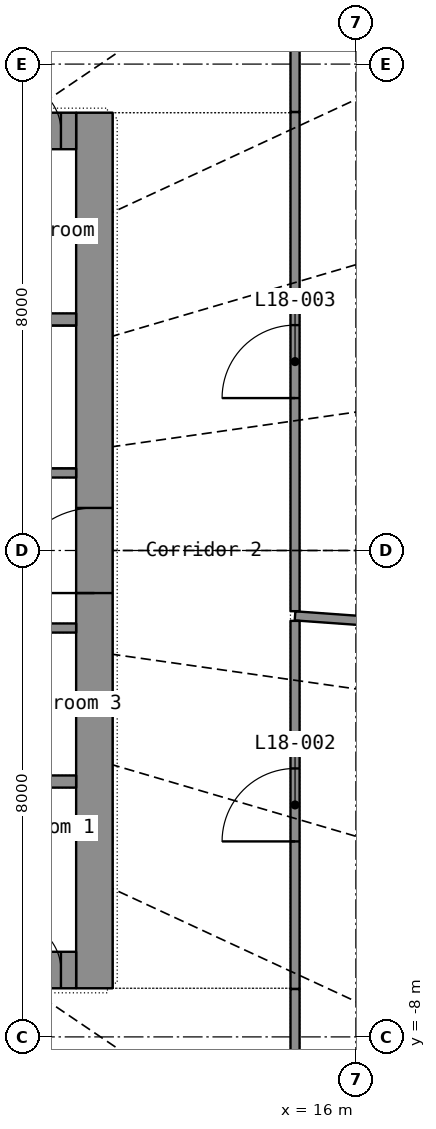
"""IFC4 building model, lengths in metres.
Left out: names, types, materials, properties, quantities, classifications, styles, units other than length and angle.
Written with IfcOpenShell. Run it as: python <this file> out.ifc"""

import sys

from ifc_helpers import new_model, si_unit, direction, frame, frame_2d, origin, place, context, subcontext, project, spatial, rectangle, extrude, element, fill, save


model = new_model("IFC4")
c1 = context("Model", 3, precision=1e-05, world=origin(), true_north=direction((0.0, 1.0)))
c2 = subcontext(c1, "Body", "Model", "MODEL_VIEW")
j1 = project(units=[si_unit("LENGTHUNIT", "METRE"), si_unit("PLANEANGLEUNIT", "RADIAN")], contexts=[c1])
p1 = place(None, origin())
s1 = spatial("IfcSite", under=j1, at=p1, CompositionType="ELEMENT")
p2 = place(p1, origin())
s2 = spatial("IfcBuilding", under=s1, at=p2, CompositionType="ELEMENT")
p3 = place(p2, frame((0.0, 0.0, 77.8)))
s3 = spatial("IfcBuildingStorey", under=s2, at=p3, CompositionType="ELEMENT", Elevation=77.8)
p4 = place(p3, frame((11.7, -7.2, 0.0), z_axis=(0.0, 0.0, 1.0), x_axis=(0.0, 1.0, 0.0)))
e1 = element("IfcWall", 1, at=p4, inside=s3, PredefinedType="SHEAR", context=c2, shape_type="SweptSolid", body=[
    extrude(rectangle(XDim=14.4, YDim=0.6, at=frame_2d((7.2, 0.0))), origin(), (0.0, 0.0, 1.0), 3.3),
])
p5 = place(p4, frame((6.5, 0.0, 0.0)))
e2 = element("IfcOpeningElement", 2, at=p5, cuts=e1, PredefinedType="OPENING", context=c2, shape_type="SweptSolid", body=[
    extrude(rectangle(XDim=1.4, YDim=2.2, at=frame_2d((0.7, 1.1))), frame((0.0, 0.31, 0.0), z_axis=(0.0, -1.0, 0.0), x_axis=(1.0, 0.0, 0.0)), (0.0, 0.0, 1.0), 0.62),
])
p6 = place(p3, frame((-11.4, -6.9, 0.0), z_axis=(0.0, 0.0, 1.0), x_axis=(1.0, 0.0, 0.0)))
e3 = element("IfcWall", 3, at=p6, inside=s3, PredefinedType="SHEAR", context=c2, shape_type="SweptSolid", body=[
    extrude(rectangle(XDim=22.8, YDim=0.6, at=frame_2d((11.4, 0.0))), origin(), (0.0, 0.0, 1.0), 3.3),
])
p7 = place(p6, frame((1.85, 0.0, 0.0)))
e4 = element("IfcOpeningElement", 4, at=p7, cuts=e3, PredefinedType="OPENING", context=c2, shape_type="SweptSolid", body=[
    extrude(rectangle(XDim=1.1, YDim=2.2, at=frame_2d((0.55, 1.1))), frame((0.0, 0.31, 0.0), z_axis=(0.0, -1.0, 0.0), x_axis=(1.0, 0.0, 0.0)), (0.0, 0.0, 1.0), 0.62),
])
p8 = place(p6, frame((3.85, 0.0, 0.0)))
e5 = element("IfcOpeningElement", 5, at=p8, cuts=e3, PredefinedType="OPENING", context=c2, shape_type="SweptSolid", body=[
    extrude(rectangle(XDim=1.1, YDim=2.2, at=frame_2d((0.55, 1.1))), frame((0.0, 0.31, 0.0), z_axis=(0.0, -1.0, 0.0), x_axis=(1.0, 0.0, 0.0)), (0.0, 0.0, 1.0), 0.62),
])
p9 = place(p6, frame((5.85, 0.0, 0.0)))
e6 = element("IfcOpeningElement", 6, at=p9, cuts=e3, PredefinedType="OPENING", context=c2, shape_type="SweptSolid", body=[
    extrude(rectangle(XDim=1.1, YDim=2.2, at=frame_2d((0.55, 1.1))), frame((0.0, 0.31, 0.0), z_axis=(0.0, -1.0, 0.0), x_axis=(1.0, 0.0, 0.0)), (0.0, 0.0, 1.0), 0.62),
])
p10 = place(p6, frame((7.85, 0.0, 0.0)))
e7 = element("IfcOpeningElement", 7, at=p10, cuts=e3, PredefinedType="OPENING", context=c2, shape_type="SweptSolid", body=[
    extrude(rectangle(XDim=1.1, YDim=2.2, at=frame_2d((0.55, 1.1))), frame((0.0, 0.31, 0.0), z_axis=(0.0, -1.0, 0.0), x_axis=(1.0, 0.0, 0.0)), (0.0, 0.0, 1.0), 0.62),
])
p11 = place(p6, frame((9.85, 0.0, 0.0)))
e8 = element("IfcOpeningElement", 8, at=p11, cuts=e3, PredefinedType="OPENING", context=c2, shape_type="SweptSolid", body=[
    extrude(rectangle(XDim=1.1, YDim=2.2, at=frame_2d((0.55, 1.1))), frame((0.0, 0.31, 0.0), z_axis=(0.0, -1.0, 0.0), x_axis=(1.0, 0.0, 0.0)), (0.0, 0.0, 1.0), 0.62),
])
p12 = place(p6, frame((11.85, 0.0, 0.0)))
e9 = element("IfcOpeningElement", 9, at=p12, cuts=e3, PredefinedType="OPENING", context=c2, shape_type="SweptSolid", body=[
    extrude(rectangle(XDim=1.1, YDim=2.2, at=frame_2d((0.55, 1.1))), frame((0.0, 0.31, 0.0), z_axis=(0.0, -1.0, 0.0), x_axis=(1.0, 0.0, 0.0)), (0.0, 0.0, 1.0), 0.62),
])
p13 = place(p6, frame((13.85, 0.0, 0.0)))
e10 = element("IfcOpeningElement", 10, at=p13, cuts=e3, PredefinedType="OPENING", context=c2, shape_type="SweptSolid", body=[
    extrude(rectangle(XDim=1.1, YDim=2.2, at=frame_2d((0.55, 1.1))), frame((0.0, 0.31, 0.0), z_axis=(0.0, -1.0, 0.0), x_axis=(1.0, 0.0, 0.0)), (0.0, 0.0, 1.0), 0.62),
])
p14 = place(p6, frame((15.85, 0.0, 0.0)))
e11 = element("IfcOpeningElement", 11, at=p14, cuts=e3, PredefinedType="OPENING", context=c2, shape_type="SweptSolid", body=[
    extrude(rectangle(XDim=1.1, YDim=2.2, at=frame_2d((0.55, 1.1))), frame((0.0, 0.31, 0.0), z_axis=(0.0, -1.0, 0.0), x_axis=(1.0, 0.0, 0.0)), (0.0, 0.0, 1.0), 0.62),
])
p15 = place(p6, frame((19.85, 0.0, 0.0)))
e12 = element("IfcOpeningElement", 12, at=p15, cuts=e3, PredefinedType="OPENING", context=c2, shape_type="SweptSolid", body=[
    extrude(rectangle(XDim=1.1, YDim=2.2, at=frame_2d((0.55, 1.1))), frame((0.0, 0.31, 0.0), z_axis=(0.0, -1.0, 0.0), x_axis=(1.0, 0.0, 0.0)), (0.0, 0.0, 1.0), 0.62),
])
p16 = place(p6, frame((0.25, 0.0, 0.0)))
e13 = element("IfcOpeningElement", 13, at=p16, cuts=e3, PredefinedType="OPENING", context=c2, shape_type="SweptSolid", body=[
    extrude(rectangle(XDim=0.8, YDim=2.05, at=frame_2d((0.4, 1.025))), frame((0.0, 0.31, 0.0), z_axis=(0.0, -1.0, 0.0), x_axis=(1.0, 0.0, 0.0)), (0.0, 0.0, 1.0), 0.62),
])
p17 = place(p6, frame((21.75, 0.0, 0.0)))
e14 = element("IfcOpeningElement", 14, at=p17, cuts=e3, PredefinedType="OPENING", context=c2, shape_type="SweptSolid", body=[
    extrude(rectangle(XDim=0.8, YDim=2.05, at=frame_2d((0.4, 1.025))), frame((0.0, 0.31, 0.0), z_axis=(0.0, -1.0, 0.0), x_axis=(1.0, 0.0, 0.0)), (0.0, 0.0, 1.0), 0.62),
])
p18 = place(p3, frame((-11.4, 6.9, 0.0), z_axis=(0.0, 0.0, 1.0), x_axis=(1.0, 0.0, 0.0)))
e15 = element("IfcWall", 15, at=p18, inside=s3, PredefinedType="SHEAR", context=c2, shape_type="SweptSolid", body=[
    extrude(rectangle(XDim=22.8, YDim=0.6, at=frame_2d((11.4, 0.0))), origin(), (0.0, 0.0, 1.0), 3.3),
])
p19 = place(p18, frame((1.85, 0.0, 0.0)))
e16 = element("IfcOpeningElement", 16, at=p19, cuts=e15, PredefinedType="OPENING", context=c2, shape_type="SweptSolid", body=[
    extrude(rectangle(XDim=1.1, YDim=2.2, at=frame_2d((0.55, 1.1))), frame((0.0, 0.31, 0.0), z_axis=(0.0, -1.0, 0.0), x_axis=(1.0, 0.0, 0.0)), (0.0, 0.0, 1.0), 0.62),
])
p20 = place(p18, frame((7.95, 0.0, 0.0)))
e17 = element("IfcOpeningElement", 17, at=p20, cuts=e15, PredefinedType="OPENING", context=c2, shape_type="SweptSolid", body=[
    extrude(rectangle(XDim=0.9, YDim=2.1, at=frame_2d((0.45, 1.05))), frame((0.0, 0.31, 0.0), z_axis=(0.0, -1.0, 0.0), x_axis=(1.0, 0.0, 0.0)), (0.0, 0.0, 1.0), 0.62),
])
p21 = place(p18, frame((13.95, 0.0, 0.0)))
e18 = element("IfcOpeningElement", 18, at=p21, cuts=e15, PredefinedType="OPENING", context=c2, shape_type="SweptSolid", body=[
    extrude(rectangle(XDim=0.9, YDim=2.1, at=frame_2d((0.45, 1.05))), frame((0.0, 0.31, 0.0), z_axis=(0.0, -1.0, 0.0), x_axis=(1.0, 0.0, 0.0)), (0.0, 0.0, 1.0), 0.62),
])
p22 = place(p18, frame((18.95, 0.0, 0.0)))
e19 = element("IfcOpeningElement", 19, at=p22, cuts=e15, PredefinedType="OPENING", context=c2, shape_type="SweptSolid", body=[
    extrude(rectangle(XDim=0.9, YDim=2.1, at=frame_2d((0.45, 1.05))), frame((0.0, 0.31, 0.0), z_axis=(0.0, -1.0, 0.0), x_axis=(1.0, 0.0, 0.0)), (0.0, 0.0, 1.0), 0.62),
])
p23 = place(p18, frame((0.25, 0.0, 0.0)))
e20 = element("IfcOpeningElement", 20, at=p23, cuts=e15, PredefinedType="OPENING", context=c2, shape_type="SweptSolid", body=[
    extrude(rectangle(XDim=0.8, YDim=2.05, at=frame_2d((0.4, 1.025))), frame((0.0, 0.31, 0.0), z_axis=(0.0, -1.0, 0.0), x_axis=(1.0, 0.0, 0.0)), (0.0, 0.0, 1.0), 0.62),
])
p24 = place(p18, frame((21.75, 0.0, 0.0)))
e21 = element("IfcOpeningElement", 21, at=p24, cuts=e15, PredefinedType="OPENING", context=c2, shape_type="SweptSolid", body=[
    extrude(rectangle(XDim=0.8, YDim=2.05, at=frame_2d((0.4, 1.025))), frame((0.0, 0.31, 0.0), z_axis=(0.0, -1.0, 0.0), x_axis=(1.0, 0.0, 0.0)), (0.0, 0.0, 1.0), 0.62),
])
for number, where, z_axis, x_axis in (
    (22, (-11.4, -3.8, 0.0), (0.0, 0.0, 1.0), (1.0, 0.0, 0.0)),
    (23, (-11.4, 3.8, 0.0), (0.0, 0.0, 1.0), (1.0, 0.0, 0.0)),
):
    element("IfcWall", number, at=place(p3, frame(where, z_axis=z_axis, x_axis=x_axis)), inside=s3, PredefinedType="SHEAR", context=c2, shape_type="SweptSolid", body=[
        extrude(rectangle(XDim=22.8, YDim=0.2, at=frame_2d((11.4, 0.0))), origin(), (0.0, 0.0, 1.0), 3.3),
    ])
p25 = place(p3, frame((3.0, -1.275, 0.0), z_axis=(0.0, 0.0, 1.0), x_axis=(1.0, 0.0, 0.0)))
e24 = element("IfcWall", 24, at=p25, inside=s3, PredefinedType="PARTITIONING", context=c2, shape_type="SweptSolid", body=[
    extrude(rectangle(XDim=8.4, YDim=0.15, at=frame_2d((4.2, 0.0))), origin(), (0.0, 0.0, 1.0), 3.3),
])
p26 = place(p25, frame((0.688, 0.0, 0.0)))
e25 = element("IfcOpeningElement", 25, at=p26, cuts=e24, PredefinedType="OPENING", context=c2, shape_type="SweptSolid", body=[
    extrude(rectangle(XDim=0.85, YDim=2.1, at=frame_2d((0.425, 1.05))), frame((0.0, 0.085, 0.0), z_axis=(0.0, -1.0, 0.0), x_axis=(1.0, 0.0, 0.0)), (0.0, 0.0, 1.0), 0.17),
])
p27 = place(p25, frame((3.144, 0.0, 0.0)))
e26 = element("IfcOpeningElement", 26, at=p27, cuts=e24, PredefinedType="OPENING", context=c2, shape_type="SweptSolid", body=[
    extrude(rectangle(XDim=0.85, YDim=2.1, at=frame_2d((0.425, 1.05))), frame((0.0, 0.085, 0.0), z_axis=(0.0, -1.0, 0.0), x_axis=(1.0, 0.0, 0.0)), (0.0, 0.0, 1.0), 0.17),
])
p28 = place(p25, frame((5.256, 0.0, 0.0)))
e27 = element("IfcOpeningElement", 27, at=p28, cuts=e24, PredefinedType="OPENING", context=c2, shape_type="SweptSolid", body=[
    extrude(rectangle(XDim=0.9, YDim=2.1, at=frame_2d((0.45, 1.05))), frame((0.0, 0.085, 0.0), z_axis=(0.0, -1.0, 0.0), x_axis=(1.0, 0.0, 0.0)), (0.0, 0.0, 1.0), 0.17),
])
p29 = place(p25, frame((7.075, 0.0, 0.0)))
e28 = element("IfcOpeningElement", 28, at=p29, cuts=e24, PredefinedType="OPENING", context=c2, shape_type="SweptSolid", body=[
    extrude(rectangle(XDim=0.9, YDim=2.1, at=frame_2d((0.45, 1.05))), frame((0.0, 0.085, 0.0), z_axis=(0.0, -1.0, 0.0), x_axis=(1.0, 0.0, 0.0)), (0.0, 0.0, 1.0), 0.17),
])
p30 = place(p3, frame((3.0, 1.275, 0.0), z_axis=(0.0, 0.0, 1.0), x_axis=(1.0, 0.0, 0.0)))
e29 = element("IfcWall", 29, at=p30, inside=s3, PredefinedType="SHEAR", context=c2, shape_type="SweptSolid", body=[
    extrude(rectangle(XDim=8.4, YDim=0.15, at=frame_2d((4.2, 0.0))), origin(), (0.0, 0.0, 1.0), 3.3),
])
p31 = place(p30, frame((2.05, 0.0, 0.0)))
e30 = element("IfcOpeningElement", 30, at=p31, cuts=e29, PredefinedType="OPENING", context=c2, shape_type="SweptSolid", body=[
    extrude(rectangle(XDim=1.1, YDim=2.15, at=frame_2d((0.55, 1.075))), frame((0.0, 0.085, 0.0), z_axis=(0.0, -1.0, 0.0), x_axis=(1.0, 0.0, 0.0)), (0.0, 0.0, 1.0), 0.17),
])
p32 = place(p30, frame((0.45, 0.0, 0.0)))
e31 = element("IfcOpeningElement", 31, at=p32, cuts=e29, PredefinedType="OPENING", context=c2, shape_type="SweptSolid", body=[
    extrude(rectangle(XDim=0.9, YDim=2.1, at=frame_2d((0.45, 1.05))), frame((0.0, 0.085, 0.0), z_axis=(0.0, -1.0, 0.0), x_axis=(1.0, 0.0, 0.0)), (0.0, 0.0, 1.0), 0.17),
])
p33 = place(p3, frame((26.692, -1.913, 0.0), z_axis=(0.0, 0.0, 1.0), x_axis=(-0.997441861, 0.071482396, 0.0)))
e32 = element("IfcWall", 32, at=p33, inside=s3, PredefinedType="PARTITIONING", context=c2, shape_type="SweptSolid", body=[
    extrude(rectangle(XDim=11.722, YDim=0.15, at=frame_2d((5.861, 0.0))), origin(), (0.0, 0.0, 1.0), 2.4),
])
p34 = place(p3, frame((15.0, -0.998, 0.0), z_axis=(0.0, 0.0, 1.0), x_axis=(0.0, 1.0, 0.0)))
e33 = element("IfcWall", 33, at=p34, inside=s3, PredefinedType="PARTITIONING", context=c2, shape_type="SweptSolid", body=[
    extrude(rectangle(XDim=8.21, YDim=0.15, at=frame_2d((4.105, 0.0))), origin(), (0.0, 0.0, 1.0), 2.4),
])
p35 = place(p34, frame((3.505, 0.0, 0.0)))
e34 = element("IfcOpeningElement", 34, at=p35, cuts=e33, PredefinedType="OPENING", context=c2, shape_type="SweptSolid", body=[
    extrude(rectangle(XDim=1.2, YDim=2.2, at=frame_2d((0.6, 1.1))), frame((0.0, 0.085, 0.0), z_axis=(0.0, -1.0, 0.0), x_axis=(1.0, 0.0, 0.0)), (0.0, 0.0, 1.0), 0.17),
])
p36 = place(p3, frame((15.0, -7.212, 0.0), z_axis=(0.0, 0.0, 1.0), x_axis=(0.0, 1.0, 0.0)))
e35 = element("IfcWall", 35, at=p36, inside=s3, PredefinedType="PARTITIONING", context=c2, shape_type="SweptSolid", body=[
    extrude(rectangle(XDim=6.054, YDim=0.15, at=frame_2d((3.027, 0.0))), origin(), (0.0, 0.0, 1.0), 2.4),
])
p37 = place(p36, frame((2.427, 0.0, 0.0)))
e36 = element("IfcOpeningElement", 36, at=p37, cuts=e35, PredefinedType="OPENING", context=c2, shape_type="SweptSolid", body=[
    extrude(rectangle(XDim=1.2, YDim=2.2, at=frame_2d((0.6, 1.1))), frame((0.0, 0.085, 0.0), z_axis=(0.0, -1.0, 0.0), x_axis=(1.0, 0.0, 0.0)), (0.0, 0.0, 1.0), 0.17),
])
p38 = place(p3, frame((15.0, -10.723, 0.0), z_axis=(0.0, 0.0, 1.0), x_axis=(0.0, 1.0, 0.0)))
e37 = element("IfcWall", 37, at=p38, inside=s3, PredefinedType="PARTITIONING", context=c2, shape_type="SweptSolid", body=[
    extrude(rectangle(XDim=3.51, YDim=0.15, at=frame_2d((1.755, 0.0))), origin(), (0.0, 0.0, 1.0), 2.4),
])
p39 = place(p3, frame((15.0, 7.213, 0.0), z_axis=(0.0, 0.0, 1.0), x_axis=(0.0, 1.0, 0.0)))
e38 = element("IfcWall", 38, at=p39, inside=s3, PredefinedType="PARTITIONING", context=c2, shape_type="SweptSolid", body=[
    extrude(rectangle(XDim=2.31, YDim=0.15, at=frame_2d((1.155, 0.0))), origin(), (0.0, 0.0, 1.0), 2.4),
])
p40 = place(p17, origin())
e39 = element("IfcDoor", 39, at=p40, inside=s3, OperationType="SINGLE_SWING_LEFT", PredefinedType="DOOR", context=c2, shape_type="SweptSolid", body=[
    extrude(rectangle(XDim=0.8, YDim=2.05, at=frame_2d((0.4, 1.025))), frame((0.0, 0.025, 0.0), z_axis=(0.0, -1.0, 0.0), x_axis=(1.0, 0.0, 0.0)), (0.0, 0.0, 1.0), 0.05),
])
fill(e14, e39)
p41 = place(p24, origin())
e40 = element("IfcDoor", 40, at=p41, inside=s3, OperationType="SINGLE_SWING_LEFT", PredefinedType="DOOR", context=c2, shape_type="SweptSolid", body=[
    extrude(rectangle(XDim=0.8, YDim=2.05, at=frame_2d((0.4, 1.025))), frame((0.0, 0.025, 0.0), z_axis=(0.0, -1.0, 0.0), x_axis=(1.0, 0.0, 0.0)), (0.0, 0.0, 1.0), 0.05),
])
fill(e21, e40)
p42 = place(p5, origin())
e41 = element("IfcDoor", 41, at=p42, inside=s3, OperationType="DOUBLE_DOOR_SINGLE_SWING", PredefinedType="DOOR", context=c2, shape_type="SweptSolid", body=[
    extrude(rectangle(XDim=1.4, YDim=2.2, at=frame_2d((0.7, 1.1))), frame((0.0, 0.025, 0.0), z_axis=(0.0, -1.0, 0.0), x_axis=(1.0, 0.0, 0.0)), (0.0, 0.0, 1.0), 0.05),
])
fill(e2, e41)
p43 = place(p37, origin())
e42 = element("IfcDoor", 42, at=p43, inside=s3, OperationType="DOUBLE_DOOR_SINGLE_SWING", PredefinedType="DOOR", context=c2, shape_type="SweptSolid", body=[
    extrude(rectangle(XDim=1.2, YDim=2.2, at=frame_2d((0.6, 1.1))), frame((0.0, 0.025, 0.0), z_axis=(0.0, -1.0, 0.0), x_axis=(1.0, 0.0, 0.0)), (0.0, 0.0, 1.0), 0.05),
])
fill(e36, e42)
p44 = place(p35, origin())
e43 = element("IfcDoor", 43, at=p44, inside=s3, OperationType="DOUBLE_DOOR_SINGLE_SWING", PredefinedType="DOOR", context=c2, shape_type="SweptSolid", body=[
    extrude(rectangle(XDim=1.2, YDim=2.2, at=frame_2d((0.6, 1.1))), frame((0.0, 0.025, 0.0), z_axis=(0.0, -1.0, 0.0), x_axis=(1.0, 0.0, 0.0)), (0.0, 0.0, 1.0), 0.05),
])
fill(e34, e43)
save(model, sys.argv[1])
